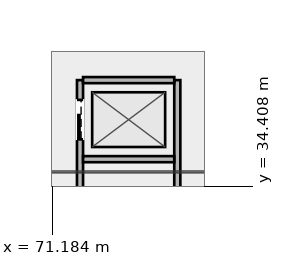
"""IFC4 building model, lengths in metres.
Left out: names, types, materials, properties, quantities, classifications, styles, units other than length and angle.
Written with IfcOpenShell. Run it as: python <this file> out.ifc"""

import sys

from ifc_helpers import new_model, si_unit, direction, frame, frame_2d, origin, place, context, subcontext, project, spatial, rectangle, extrude, element, fill, save


model = new_model("IFC4")
c1 = context("Model", 3, precision=1e-05, world=origin(), true_north=direction((0.0, 1.0)))
c2 = subcontext(c1, "Body", "Model", "MODEL_VIEW")
j1 = project(units=[si_unit("LENGTHUNIT", "METRE"), si_unit("PLANEANGLEUNIT", "RADIAN")], contexts=[c1])
p1 = place(None, origin())
s1 = spatial("IfcSite", under=j1, at=p1, CompositionType="ELEMENT")
p2 = place(p1, origin())
s2 = spatial("IfcBuilding", under=s1, at=p2, CompositionType="ELEMENT")
p3 = place(p2, frame((0.0, 0.0, 5.4)))
s3 = spatial("IfcBuildingStorey", under=s2, at=p3, CompositionType="ELEMENT", Elevation=5.4)
p4 = place(p3, frame((72.1, 26.1, 0.0), z_axis=(0.0, 0.0, 1.0), x_axis=(0.0, 1.0, 0.0)))
e1 = element("IfcWall", 1, at=p4, inside=s3, PredefinedType="SOLIDWALL", context=c2, shape_type="SweptSolid", body=[
    extrude(rectangle(XDim=11.8, YDim=0.2, at=frame_2d((5.9, 0.0))), origin(), (0.0, 0.0, 1.0), 3.583),
])
p5 = place(p4, frame((0.65, 0.0, 0.0)))
e2 = element("IfcOpeningElement", 2, at=p5, cuts=e1, PredefinedType="OPENING", context=c2, shape_type="SweptSolid", body=[
    extrude(rectangle(XDim=1.3, YDim=2.25, at=frame_2d((0.65, 1.125))), frame((0.0, 0.11, 0.0), z_axis=(0.0, -1.0, 0.0), x_axis=(1.0, 0.0, 0.0)), (0.0, 0.0, 1.0), 0.22),
])
p6 = place(p4, frame((9.85, 0.0, 0.0)))
e3 = element("IfcOpeningElement", 3, at=p6, cuts=e1, PredefinedType="OPENING", context=c2, shape_type="SweptSolid", body=[
    extrude(rectangle(XDim=1.3, YDim=2.25, at=frame_2d((0.65, 1.125))), frame((0.0, 0.11, 0.0), z_axis=(0.0, -1.0, 0.0), x_axis=(1.0, 0.0, 0.0)), (0.0, 0.0, 1.0), 0.22),
])
p7 = place(p3, frame((75.3, 26.1, 0.0), z_axis=(0.0, 0.0, 1.0), x_axis=(0.0, 1.0, 0.0)))
e4 = element("IfcWall", 4, at=p7, inside=s3, PredefinedType="SOLIDWALL", context=c2, shape_type="SweptSolid", body=[
    extrude(rectangle(XDim=11.8, YDim=0.2, at=frame_2d((5.9, 0.0))), origin(), (0.0, 0.0, 1.0), 3.583),
])
for number, where, z_axis, x_axis in (
    (5, (72.2, 35.3, 0.0), (0.0, 0.0, 1.0), (1.0, 0.0, 0.0)),
    (6, (72.2, 37.9, 0.0), (0.0, 0.0, 1.0), (1.0, 0.0, 0.0)),
):
    element("IfcWall", number, at=place(p3, frame(where, z_axis=z_axis, x_axis=x_axis)), inside=s3, PredefinedType="SOLIDWALL", context=c2, shape_type="SweptSolid", body=[
        extrude(rectangle(XDim=3.0, YDim=0.2, at=frame_2d((1.5, 0.0))), origin(), (0.0, 0.0, 1.0), 3.583),
    ])
p8 = place(p6, origin())
e7 = element("IfcDoor", 7, at=p8, inside=s3, OperationType="SLIDING_TO_LEFT", PredefinedType="DOOR", context=c2, shape_type="SweptSolid", body=[
    extrude(rectangle(XDim=1.3, YDim=2.25, at=frame_2d((0.65, 1.125))), frame((0.0, 0.025, 0.0), z_axis=(0.0, -1.0, 0.0), x_axis=(1.0, 0.0, 0.0)), (0.0, 0.0, 1.0), 0.05),
])
fill(e3, e7)
save(model, sys.argv[1])
